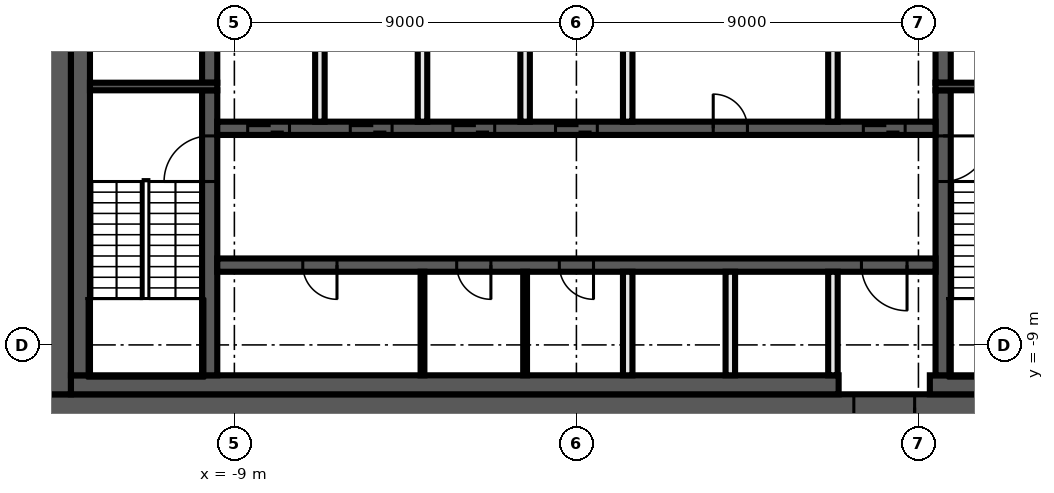
"""IFC4 building model, lengths in metres.
Left out: names, types, materials, properties, quantities, classifications, styles, units other than length and angle.
Written with IfcOpenShell. Run it as: python <this file> out.ifc"""

import sys

from ifc_helpers import new_model, si_unit, direction, frame, frame_2d, origin, place, context, subcontext, project, spatial, rectangle, extrude, element, fill, save


model = new_model("IFC4")
c1 = context("Model", 3, precision=1e-05, world=origin(), true_north=direction((0.0, 1.0)))
c2 = subcontext(c1, "Body", "Model", "MODEL_VIEW")
j1 = project(units=[si_unit("LENGTHUNIT", "METRE"), si_unit("PLANEANGLEUNIT", "RADIAN")], contexts=[c1])
p1 = place(None, origin())
s1 = spatial("IfcSite", under=j1, at=p1, CompositionType="ELEMENT")
p2 = place(p1, origin())
s2 = spatial("IfcBuilding", under=s1, at=p2, CompositionType="ELEMENT")
p3 = place(p2, frame((0.0, 0.0, 249.6)))
s3 = spatial("IfcBuildingStorey", under=s2, at=p3, CompositionType="ELEMENT", Elevation=249.6)
p4 = place(p3, frame((14.0, -10.65, 0.0), z_axis=(0.0, 0.0, 1.0), x_axis=(-1.0, 0.0, 0.0)))
e1 = element("IfcWall", 1, at=p4, inside=s3, PredefinedType="SHEAR", context=c2, shape_type="SweptSolid", body=[
    extrude(rectangle(XDim=28.0, YDim=0.7, at=frame_2d((14.0, 0.0))), origin(), (0.0, 0.0, 1.0), 3.82),
])
p5 = place(p4, frame((5.1, 0.0, 0.0)))
e2 = element("IfcOpeningElement", 2, at=p5, cuts=e1, PredefinedType="OPENING", context=c2, shape_type="SweptSolid", body=[
    extrude(rectangle(XDim=1.6, YDim=2.1, at=frame_2d((0.8, 1.05))), frame((0.0, 0.36, 0.0), z_axis=(0.0, -1.0, 0.0), x_axis=(1.0, 0.0, 0.0)), (0.0, 0.0, 1.0), 0.72),
])
p6 = place(p3, frame((-13.65, -10.3, 0.0), z_axis=(0.0, 0.0, 1.0), x_axis=(0.0, 1.0, 0.0)))
e3 = element("IfcWall", 3, at=p6, inside=s3, PredefinedType="SHEAR", context=c2, shape_type="SweptSolid", body=[
    extrude(rectangle(XDim=20.6, YDim=0.7, at=frame_2d((10.3, 0.0))), origin(), (0.0, 0.0, 1.0), 3.82),
])
p7 = place(p3, frame((13.3, -10.05, 0.0), z_axis=(0.0, 0.0, 1.0), x_axis=(-1.0, 0.0, 0.0)))
e4 = element("IfcWall", 4, at=p7, inside=s3, PredefinedType="SHEAR", context=c2, shape_type="SweptSolid", body=[
    extrude(rectangle(XDim=4.0, YDim=0.5, at=frame_2d((2.0, 0.0))), origin(), (0.0, 0.0, 1.0), 3.82),
])
p8 = place(p3, frame((6.9, -10.05, 0.0), z_axis=(0.0, 0.0, 1.0), x_axis=(-1.0, 0.0, 0.0)))
e5 = element("IfcWall", 5, at=p8, inside=s3, PredefinedType="SHEAR", context=c2, shape_type="SweptSolid", body=[
    extrude(rectangle(XDim=20.2, YDim=0.5, at=frame_2d((10.1, 0.0))), origin(), (0.0, 0.0, 1.0), 3.82),
])
p9 = place(p3, frame((-13.05, -9.8, 0.0), z_axis=(0.0, 0.0, 1.0), x_axis=(0.0, 1.0, 0.0)))
e6 = element("IfcWall", 6, at=p9, inside=s3, PredefinedType="SHEAR", context=c2, shape_type="SweptSolid", body=[
    extrude(rectangle(XDim=19.6, YDim=0.5, at=frame_2d((9.8, 0.0))), origin(), (0.0, 0.0, 1.0), 3.82),
])
p10 = place(p3, frame((9.65, -2.3, 0.0), z_axis=(0.0, 0.0, 1.0), x_axis=(0.0, -1.0, 0.0)))
e7 = element("IfcWall", 7, at=p10, inside=s3, PredefinedType="SHEAR", context=c2, shape_type="SweptSolid", body=[
    extrude(rectangle(XDim=7.5, YDim=0.4, at=frame_2d((3.75, 0.0))), origin(), (0.0, 0.0, 1.0), 3.82),
])
p11 = place(p10, frame((1.2, 0.0, 0.0)))
e8 = element("IfcOpeningElement", 8, at=p11, cuts=e7, PredefinedType="OPENING", context=c2, shape_type="SweptSolid", body=[
    extrude(rectangle(XDim=1.2, YDim=2.1, at=frame_2d((0.6, 1.05))), frame((0.0, 0.21, 0.0), z_axis=(0.0, -1.0, 0.0), x_axis=(1.0, 0.0, 0.0)), (0.0, 0.0, 1.0), 0.42),
])
p12 = place(p3, frame((9.65, 2.1, 0.0), z_axis=(0.0, 0.0, 1.0), x_axis=(0.0, -1.0, 0.0)))
e9 = element("IfcWall", 9, at=p12, inside=s3, PredefinedType="SHEAR", context=c2, shape_type="SweptSolid", body=[
    extrude(rectangle(XDim=4.2, YDim=0.4, at=frame_2d((2.1, 0.0))), origin(), (0.0, 0.0, 1.0), 3.82),
])
p13 = place(p12, frame((0.15, 0.0, 0.0)))
e10 = element("IfcOpeningElement", 10, at=p13, cuts=e9, PredefinedType="OPENING", context=c2, shape_type="SweptSolid", body=[
    extrude(rectangle(XDim=0.9, YDim=2.1, at=frame_2d((0.45, 1.05))), frame((0.0, 0.21, 0.0), z_axis=(0.0, -1.0, 0.0), x_axis=(1.0, 0.0, 0.0)), (0.0, 0.0, 1.0), 0.42),
])
p14 = place(p3, frame((-9.65, -9.8, 0.0), z_axis=(0.0, 0.0, 1.0), x_axis=(0.0, 1.0, 0.0)))
e11 = element("IfcWall", 11, at=p14, inside=s3, PredefinedType="SHEAR", context=c2, shape_type="SweptSolid", body=[
    extrude(rectangle(XDim=7.5, YDim=0.4, at=frame_2d((3.75, 0.0))), origin(), (0.0, 0.0, 1.0), 3.82),
])
p15 = place(p14, frame((5.1, 0.0, 0.0)))
e12 = element("IfcOpeningElement", 12, at=p15, cuts=e11, PredefinedType="OPENING", context=c2, shape_type="SweptSolid", body=[
    extrude(rectangle(XDim=1.2, YDim=2.1, at=frame_2d((0.6, 1.05))), frame((0.0, 0.21, 0.0), z_axis=(0.0, -1.0, 0.0), x_axis=(1.0, 0.0, 0.0)), (0.0, 0.0, 1.0), 0.42),
])
p16 = place(p3, frame((-9.65, -2.1, 0.0), z_axis=(0.0, 0.0, 1.0), x_axis=(0.0, 1.0, 0.0)))
e13 = element("IfcWall", 13, at=p16, inside=s3, PredefinedType="SHEAR", context=c2, shape_type="SweptSolid", body=[
    extrude(rectangle(XDim=4.2, YDim=0.4, at=frame_2d((2.1, 0.0))), origin(), (0.0, 0.0, 1.0), 3.82),
])
for number, where, z_axis, x_axis in (
    (14, (9.45, -2.2, 0.0), (0.0, 0.0, 1.0), (1.0, 0.0, 0.0)),
    (15, (-9.45, -2.2, 0.0), (0.0, 0.0, 1.0), (-1.0, 0.0, 0.0)),
):
    element("IfcWall", number, at=place(p3, frame(where, z_axis=z_axis, x_axis=x_axis)), inside=s3, PredefinedType="SHEAR", context=c2, shape_type="SweptSolid", body=[
        extrude(rectangle(XDim=3.35, YDim=0.2, at=frame_2d((1.675, 0.0))), origin(), (0.0, 0.0, 1.0), 3.82),
    ])
p17 = place(p3, frame((-9.45, -3.3, 0.0), z_axis=(0.0, 0.0, 1.0), x_axis=(1.0, 0.0, 0.0)))
e16 = element("IfcWall", 16, at=p17, inside=s3, PredefinedType="SHEAR", context=c2, shape_type="SweptSolid", body=[
    extrude(rectangle(XDim=18.9, YDim=0.35, at=frame_2d((9.45, 0.0))), origin(), (0.0, 0.0, 1.0), 3.82),
])
p18 = place(p17, frame((0.8, 0.0, 0.0)))
e17 = element("IfcOpeningElement", 17, at=p18, cuts=e16, PredefinedType="OPENING", context=c2, shape_type="SweptSolid", body=[
    extrude(rectangle(XDim=1.1, YDim=2.1, at=frame_2d((0.55, 1.05))), frame((0.0, 0.185, 0.0), z_axis=(0.0, -1.0, 0.0), x_axis=(1.0, 0.0, 0.0)), (0.0, 0.0, 1.0), 0.37),
])
p19 = place(p17, frame((3.5, 0.0, 0.0)))
e18 = element("IfcOpeningElement", 18, at=p19, cuts=e16, PredefinedType="OPENING", context=c2, shape_type="SweptSolid", body=[
    extrude(rectangle(XDim=1.1, YDim=2.1, at=frame_2d((0.55, 1.05))), frame((0.0, 0.185, 0.0), z_axis=(0.0, -1.0, 0.0), x_axis=(1.0, 0.0, 0.0)), (0.0, 0.0, 1.0), 0.37),
])
p20 = place(p17, frame((6.2, 0.0, 0.0)))
e19 = element("IfcOpeningElement", 19, at=p20, cuts=e16, PredefinedType="OPENING", context=c2, shape_type="SweptSolid", body=[
    extrude(rectangle(XDim=1.1, YDim=2.1, at=frame_2d((0.55, 1.05))), frame((0.0, 0.185, 0.0), z_axis=(0.0, -1.0, 0.0), x_axis=(1.0, 0.0, 0.0)), (0.0, 0.0, 1.0), 0.37),
])
p21 = place(p17, frame((8.9, 0.0, 0.0)))
e20 = element("IfcOpeningElement", 20, at=p21, cuts=e16, PredefinedType="OPENING", context=c2, shape_type="SweptSolid", body=[
    extrude(rectangle(XDim=1.1, YDim=2.1, at=frame_2d((0.55, 1.05))), frame((0.0, 0.185, 0.0), z_axis=(0.0, -1.0, 0.0), x_axis=(1.0, 0.0, 0.0)), (0.0, 0.0, 1.0), 0.37),
])
p22 = place(p17, frame((17.0, 0.0, 0.0)))
e21 = element("IfcOpeningElement", 21, at=p22, cuts=e16, PredefinedType="OPENING", context=c2, shape_type="SweptSolid", body=[
    extrude(rectangle(XDim=1.1, YDim=2.1, at=frame_2d((0.55, 1.05))), frame((0.0, 0.185, 0.0), z_axis=(0.0, -1.0, 0.0), x_axis=(1.0, 0.0, 0.0)), (0.0, 0.0, 1.0), 0.37),
])
p23 = place(p17, frame((13.05, 0.0, 0.0)))
e22 = element("IfcOpeningElement", 22, at=p23, cuts=e16, PredefinedType="OPENING", context=c2, shape_type="SweptSolid", body=[
    extrude(rectangle(XDim=0.9, YDim=2.1, at=frame_2d((0.45, 1.05))), frame((0.0, 0.185, 0.0), z_axis=(0.0, -1.0, 0.0), x_axis=(1.0, 0.0, 0.0)), (0.0, 0.0, 1.0), 0.37),
])
p24 = place(p3, frame((9.45, -6.9, 0.0), z_axis=(0.0, 0.0, 1.0), x_axis=(-1.0, 0.0, 0.0)))
e23 = element("IfcWall", 23, at=p24, inside=s3, PredefinedType="SHEAR", context=c2, shape_type="SweptSolid", body=[
    extrude(rectangle(XDim=18.9, YDim=0.35, at=frame_2d((9.45, 0.0))), origin(), (0.0, 0.0, 1.0), 3.82),
])
p25 = place(p24, frame((0.75, 0.0, 0.0)))
e24 = element("IfcOpeningElement", 24, at=p25, cuts=e23, PredefinedType="OPENING", context=c2, shape_type="SweptSolid", body=[
    extrude(rectangle(XDim=1.2, YDim=2.1, at=frame_2d((0.6, 1.05))), frame((0.0, 0.185, 0.0), z_axis=(0.0, -1.0, 0.0), x_axis=(1.0, 0.0, 0.0)), (0.0, 0.0, 1.0), 0.37),
])
p26 = place(p24, frame((15.75, 0.0, 0.0)))
e25 = element("IfcOpeningElement", 25, at=p26, cuts=e23, PredefinedType="OPENING", context=c2, shape_type="SweptSolid", body=[
    extrude(rectangle(XDim=0.9, YDim=2.1, at=frame_2d((0.45, 1.05))), frame((0.0, 0.185, 0.0), z_axis=(0.0, -1.0, 0.0), x_axis=(1.0, 0.0, 0.0)), (0.0, 0.0, 1.0), 0.37),
])
p27 = place(p24, frame((11.7, 0.0, 0.0)))
e26 = element("IfcOpeningElement", 26, at=p27, cuts=e23, PredefinedType="OPENING", context=c2, shape_type="SweptSolid", body=[
    extrude(rectangle(XDim=0.9, YDim=2.1, at=frame_2d((0.45, 1.05))), frame((0.0, 0.185, 0.0), z_axis=(0.0, -1.0, 0.0), x_axis=(1.0, 0.0, 0.0)), (0.0, 0.0, 1.0), 0.37),
])
p28 = place(p24, frame((9.0, 0.0, 0.0)))
e27 = element("IfcOpeningElement", 27, at=p28, cuts=e23, PredefinedType="OPENING", context=c2, shape_type="SweptSolid", body=[
    extrude(rectangle(XDim=0.9, YDim=2.1, at=frame_2d((0.45, 1.05))), frame((0.0, 0.185, 0.0), z_axis=(0.0, -1.0, 0.0), x_axis=(1.0, 0.0, 0.0)), (0.0, 0.0, 1.0), 0.37),
])
for number, where, z_axis, x_axis in (
    (28, (6.75, -9.8, 0.0), (0.0, 0.0, 1.0), (0.0, 1.0, 0.0)),
    (29, (6.75, -3.125, 0.0), (0.0, 0.0, 1.0), (0.0, 1.0, 0.0)),
    (30, (4.05, -9.8, 0.0), (0.0, 0.0, 1.0), (0.0, 1.0, 0.0)),
    (31, (1.35, -9.8, 0.0), (0.0, 0.0, 1.0), (0.0, 1.0, 0.0)),
    (32, (1.35, -3.125, 0.0), (0.0, 0.0, 1.0), (0.0, 1.0, 0.0)),
):
    element("IfcWall", number, at=place(p3, frame(where, z_axis=z_axis, x_axis=x_axis)), inside=s3, PredefinedType="SOLIDWALL", context=c2, shape_type="SweptSolid", body=[
        extrude(rectangle(XDim=2.725, YDim=0.25, at=frame_2d((1.363, 0.0))), origin(), (0.0, 0.0, 1.0), 3.82),
    ])
p29 = place(p3, frame((-1.35, -9.8, 0.0), z_axis=(0.0, 0.0, 1.0), x_axis=(0.0, 1.0, 0.0)))
e33 = element("IfcWall", 33, at=p29, inside=s3, PredefinedType="PARTITIONING", context=c2, shape_type="SweptSolid", body=[
    extrude(rectangle(XDim=2.725, YDim=0.1, at=frame_2d((1.363, 0.0))), origin(), (0.0, 0.0, 1.0), 3.82),
])
p30 = place(p3, frame((-1.35, -3.125, 0.0), z_axis=(0.0, 0.0, 1.0), x_axis=(0.0, 1.0, 0.0)))
e34 = element("IfcWall", 34, at=p30, inside=s3, PredefinedType="SOLIDWALL", context=c2, shape_type="SweptSolid", body=[
    extrude(rectangle(XDim=2.725, YDim=0.25, at=frame_2d((1.363, 0.0))), origin(), (0.0, 0.0, 1.0), 3.82),
])
p31 = place(p3, frame((-4.05, -9.8, 0.0), z_axis=(0.0, 0.0, 1.0), x_axis=(0.0, 1.0, 0.0)))
e35 = element("IfcWall", 35, at=p31, inside=s3, PredefinedType="PARTITIONING", context=c2, shape_type="SweptSolid", body=[
    extrude(rectangle(XDim=2.725, YDim=0.1, at=frame_2d((1.363, 0.0))), origin(), (0.0, 0.0, 1.0), 3.82),
])
for number, where, z_axis, x_axis in (
    (36, (-4.05, -3.125, 0.0), (0.0, 0.0, 1.0), (0.0, 1.0, 0.0)),
    (37, (-6.75, -3.125, 0.0), (0.0, 0.0, 1.0), (0.0, 1.0, 0.0)),
):
    element("IfcWall", number, at=place(p3, frame(where, z_axis=z_axis, x_axis=x_axis)), inside=s3, PredefinedType="SOLIDWALL", context=c2, shape_type="SweptSolid", body=[
        extrude(rectangle(XDim=2.725, YDim=0.25, at=frame_2d((1.363, 0.0))), origin(), (0.0, 0.0, 1.0), 3.82),
    ])
p32 = place(p18, origin())
e38 = element("IfcDoor", 38, at=p32, inside=s3, OperationType="DOUBLE_DOOR_SLIDING", PredefinedType="DOOR", context=c2, shape_type="SweptSolid", body=[
    extrude(rectangle(XDim=1.1, YDim=2.1, at=frame_2d((0.55, 1.05))), frame((0.0, 0.025, 0.0), z_axis=(0.0, -1.0, 0.0), x_axis=(1.0, 0.0, 0.0)), (0.0, 0.0, 1.0), 0.05),
])
fill(e17, e38)
p33 = place(p19, origin())
e39 = element("IfcDoor", 39, at=p33, inside=s3, OperationType="DOUBLE_DOOR_SLIDING", PredefinedType="DOOR", context=c2, shape_type="SweptSolid", body=[
    extrude(rectangle(XDim=1.1, YDim=2.1, at=frame_2d((0.55, 1.05))), frame((0.0, 0.025, 0.0), z_axis=(0.0, -1.0, 0.0), x_axis=(1.0, 0.0, 0.0)), (0.0, 0.0, 1.0), 0.05),
])
fill(e18, e39)
p34 = place(p20, origin())
e40 = element("IfcDoor", 40, at=p34, inside=s3, OperationType="DOUBLE_DOOR_SLIDING", PredefinedType="DOOR", context=c2, shape_type="SweptSolid", body=[
    extrude(rectangle(XDim=1.1, YDim=2.1, at=frame_2d((0.55, 1.05))), frame((0.0, 0.025, 0.0), z_axis=(0.0, -1.0, 0.0), x_axis=(1.0, 0.0, 0.0)), (0.0, 0.0, 1.0), 0.05),
])
fill(e19, e40)
p35 = place(p21, origin())
e41 = element("IfcDoor", 41, at=p35, inside=s3, OperationType="DOUBLE_DOOR_SLIDING", PredefinedType="DOOR", context=c2, shape_type="SweptSolid", body=[
    extrude(rectangle(XDim=1.1, YDim=2.1, at=frame_2d((0.55, 1.05))), frame((0.0, 0.025, 0.0), z_axis=(0.0, -1.0, 0.0), x_axis=(1.0, 0.0, 0.0)), (0.0, 0.0, 1.0), 0.05),
])
fill(e20, e41)
p36 = place(p22, origin())
e42 = element("IfcDoor", 42, at=p36, inside=s3, OperationType="DOUBLE_DOOR_SLIDING", PredefinedType="DOOR", context=c2, shape_type="SweptSolid", body=[
    extrude(rectangle(XDim=1.1, YDim=2.1, at=frame_2d((0.55, 1.05))), frame((0.0, 0.025, 0.0), z_axis=(0.0, -1.0, 0.0), x_axis=(1.0, 0.0, 0.0)), (0.0, 0.0, 1.0), 0.05),
])
fill(e21, e42)
p37 = place(p5, origin())
e43 = element("IfcDoor", 43, at=p37, inside=s3, OperationType="DOUBLE_DOOR_SINGLE_SWING", PredefinedType="DOOR", context=c2, shape_type="SweptSolid", body=[
    extrude(rectangle(XDim=1.6, YDim=2.1, at=frame_2d((0.8, 1.05))), frame((0.0, 0.025, 0.0), z_axis=(0.0, -1.0, 0.0), x_axis=(1.0, 0.0, 0.0)), (0.0, 0.0, 1.0), 0.05),
])
fill(e2, e43)
p38 = place(p25, origin())
e44 = element("IfcDoor", 44, at=p38, inside=s3, OperationType="SINGLE_SWING_LEFT", PredefinedType="DOOR", context=c2, shape_type="SweptSolid", body=[
    extrude(rectangle(XDim=1.2, YDim=2.1, at=frame_2d((0.6, 1.05))), frame((0.0, 0.025, 0.0), z_axis=(0.0, -1.0, 0.0), x_axis=(1.0, 0.0, 0.0)), (0.0, 0.0, 1.0), 0.05),
])
fill(e24, e44)
p39 = place(p23, origin())
e45 = element("IfcDoor", 45, at=p39, inside=s3, OperationType="SINGLE_SWING_RIGHT", PredefinedType="DOOR", context=c2, shape_type="SweptSolid", body=[
    extrude(rectangle(XDim=0.9, YDim=2.1, at=frame_2d((0.45, 1.05))), frame((0.0, 0.025, 0.0), z_axis=(0.0, -1.0, 0.0), x_axis=(1.0, 0.0, 0.0)), (0.0, 0.0, 1.0), 0.05),
])
fill(e22, e45)
p40 = place(p26, origin())
e46 = element("IfcDoor", 46, at=p40, inside=s3, OperationType="SINGLE_SWING_LEFT", PredefinedType="DOOR", context=c2, shape_type="SweptSolid", body=[
    extrude(rectangle(XDim=0.9, YDim=2.1, at=frame_2d((0.45, 1.05))), frame((0.0, 0.025, 0.0), z_axis=(0.0, -1.0, 0.0), x_axis=(1.0, 0.0, 0.0)), (0.0, 0.0, 1.0), 0.05),
])
fill(e25, e46)
p41 = place(p27, origin())
e47 = element("IfcDoor", 47, at=p41, inside=s3, OperationType="SINGLE_SWING_RIGHT", PredefinedType="DOOR", context=c2, shape_type="SweptSolid", body=[
    extrude(rectangle(XDim=0.9, YDim=2.1, at=frame_2d((0.45, 1.05))), frame((0.0, 0.025, 0.0), z_axis=(0.0, -1.0, 0.0), x_axis=(1.0, 0.0, 0.0)), (0.0, 0.0, 1.0), 0.05),
])
fill(e26, e47)
p42 = place(p28, origin())
e48 = element("IfcDoor", 48, at=p42, inside=s3, OperationType="SINGLE_SWING_LEFT", PredefinedType="DOOR", context=c2, shape_type="SweptSolid", body=[
    extrude(rectangle(XDim=0.9, YDim=2.1, at=frame_2d((0.45, 1.05))), frame((0.0, 0.025, 0.0), z_axis=(0.0, -1.0, 0.0), x_axis=(1.0, 0.0, 0.0)), (0.0, 0.0, 1.0), 0.05),
])
fill(e27, e48)
p43 = place(p11, origin())
e49 = element("IfcDoor", 49, at=p43, inside=s3, OperationType="SINGLE_SWING_RIGHT", PredefinedType="DOOR", context=c2, shape_type="SweptSolid", body=[
    extrude(rectangle(XDim=1.2, YDim=2.1, at=frame_2d((0.6, 1.05))), frame((0.0, 0.025, 0.0), z_axis=(0.0, -1.0, 0.0), x_axis=(1.0, 0.0, 0.0)), (0.0, 0.0, 1.0), 0.05),
])
fill(e8, e49)
p44 = place(p15, origin())
e50 = element("IfcDoor", 50, at=p44, inside=s3, OperationType="SINGLE_SWING_LEFT", PredefinedType="DOOR", context=c2, shape_type="SweptSolid", body=[
    extrude(rectangle(XDim=1.2, YDim=2.1, at=frame_2d((0.6, 1.05))), frame((0.0, 0.025, 0.0), z_axis=(0.0, -1.0, 0.0), x_axis=(1.0, 0.0, 0.0)), (0.0, 0.0, 1.0), 0.05),
])
fill(e12, e50)
save(model, sys.argv[1])
